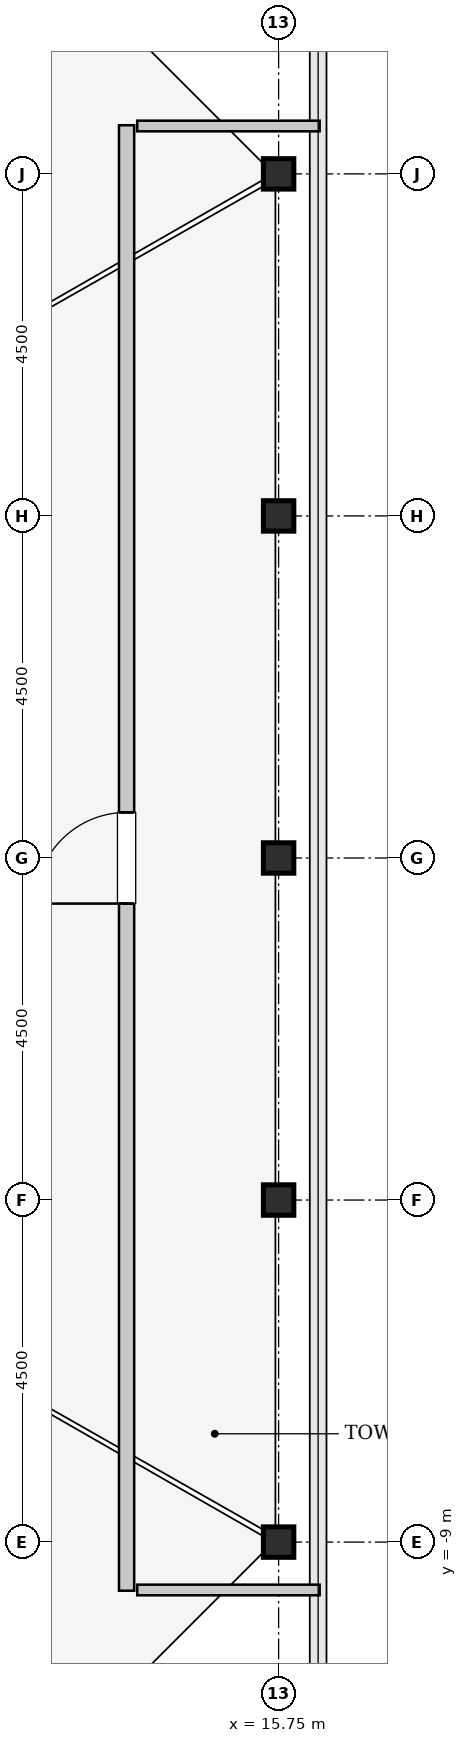
"""IFC4 building model, lengths in metres.
Left out: names, types, materials, properties, quantities, classifications, styles, units other than length and angle.
Written with IfcOpenShell. Run it as: python <this file> out.ifc"""

import sys

from ifc_helpers import new_model, si_unit, direction, frame, frame_2d, origin, origin_2d, place, context, subcontext, project, spatial, rectangle, hollow_rectangle, extrude, source, transform, mapped, element, fill, save


model = new_model("IFC4")
c1 = context("Model", 3, precision=1e-05, world=origin(), true_north=direction((0.0, 1.0)))
c2 = subcontext(c1, "Body", "Model", "MODEL_VIEW")
j1 = project(units=[si_unit("LENGTHUNIT", "METRE"), si_unit("PLANEANGLEUNIT", "RADIAN")], contexts=[c1])
p1 = place(None, origin())
s1 = spatial("IfcSite", under=j1, at=p1, CompositionType="ELEMENT")
p2 = place(p1, origin())
s2 = spatial("IfcBuilding", under=s1, at=p2, CompositionType="ELEMENT")
p3 = place(p2, frame((0.0, 0.0, 367.4)))
s3 = spatial("IfcBuildingStorey", under=s2, at=p3, CompositionType="ELEMENT", Elevation=367.4)
m1 = source(origin(), c2, "Body", "SweptSolid", [
    extrude(hollow_rectangle(XDim=0.4, YDim=0.4, WallThickness=0.02, InnerFilletRadius=0.02, OuterFilletRadius=0.04, at=origin_2d()), origin(), (0.0, 0.0, 1.0), 4.4),
])
for number, where, z_axis, x_axis in (
    (1, (15.75, -9.0, 0.0), (0.0, 0.0, 1.0), (1.0, 0.0, 0.0)),
    (2, (15.75, -4.5, 0.0), (0.0, 0.0, 1.0), (1.0, 0.0, 0.0)),
    (3, (15.75, 0.0, 0.0), (0.0, 0.0, 1.0), (1.0, 0.0, 0.0)),
    (4, (15.75, 4.5, 0.0), (0.0, 0.0, 1.0), (1.0, 0.0, 0.0)),
    (5, (15.75, 9.0, 0.0), (0.0, 0.0, 1.0), (1.0, 0.0, 0.0)),
):
    element("IfcColumn", number, at=place(p3, frame(where, z_axis=z_axis, x_axis=x_axis)), inside=s3, PredefinedType="COLUMN", context=c2, shape_type="MappedRepresentation", body=[
        mapped(m1, transform((0.0, 0.0, 0.0), x_axis=(1.0, 0.0, 0.0), y_axis=(0.0, 1.0, 0.0), z_axis=(0.0, 0.0, 1.0), scale=1.0)),
    ])
m2 = source(origin(), c2, "Body", "SweptSolid", [
    extrude(rectangle(XDim=19.28, YDim=0.2, at=frame_2d((9.64, 0.0))), origin(), (0.0, 0.0, 1.0), 4.085),
])
p4 = place(p3, frame((13.75, -9.64, 0.0), z_axis=(0.0, 0.0, 1.0), x_axis=(0.0, 1.0, 0.0)))
e6 = element("IfcWall", 6, at=p4, inside=s3, PredefinedType="SOLIDWALL", context=c2, shape_type="MappedRepresentation", body=[
    mapped(m2, transform((0.0, 0.0, 0.0), x_axis=(1.0, 0.0, 0.0), y_axis=(0.0, 1.0, 0.0), z_axis=(0.0, 0.0, 1.0), scale=1.0)),
])
p5 = place(p4, frame((9.04, 0.0, 0.0)))
e7 = element("IfcOpeningElement", 7, at=p5, cuts=e6, PredefinedType="OPENING", context=c2, shape_type="SweptSolid", body=[
    extrude(rectangle(XDim=1.2, YDim=2.15, at=frame_2d((0.6, 1.075))), frame((0.0, 0.11, 0.0), z_axis=(0.0, -1.0, 0.0), x_axis=(1.0, 0.0, 0.0)), (0.0, 0.0, 1.0), 0.22),
])
m3 = source(origin(), c2, "Body", "SweptSolid", [
    extrude(rectangle(XDim=2.4, YDim=0.14, at=frame_2d((1.2, 0.0))), origin(), (0.0, 0.0, 1.0), 4.085),
])
for number, where, z_axis, x_axis in (
    (8, (13.89, 9.63, 0.0), (0.0, 0.0, 1.0), (1.0, 0.0, 0.0)),
    (9, (13.89, -9.63, 0.0), (0.0, 0.0, 1.0), (1.0, 0.0, 0.0)),
):
    element("IfcWall", number, at=place(p3, frame(where, z_axis=z_axis, x_axis=x_axis)), inside=s3, PredefinedType="PARTITIONING", context=c2, shape_type="MappedRepresentation", body=[
        mapped(m3, transform((0.0, 0.0, 0.0), x_axis=(1.0, 0.0, 0.0), y_axis=(0.0, 1.0, 0.0), z_axis=(0.0, 0.0, 1.0), scale=1.0)),
    ])
m4 = source(origin(), c2, "Body", "SweptSolid", [
    extrude(rectangle(XDim=1.2, YDim=2.15, at=frame_2d((0.6, 1.075))), frame((0.0, 0.025, 0.0), z_axis=(0.0, -1.0, 0.0), x_axis=(1.0, 0.0, 0.0)), (0.0, 0.0, 1.0), 0.05),
])
p6 = place(p5, origin())
e10 = element("IfcDoor", 10, at=p6, inside=s3, OperationType="SINGLE_SWING_LEFT", PredefinedType="DOOR", context=c2, shape_type="MappedRepresentation", body=[
    mapped(m4, transform((0.0, 0.0, 0.0), x_axis=(1.0, 0.0, 0.0), y_axis=(0.0, 1.0, 0.0), z_axis=(0.0, 0.0, 1.0), scale=1.0)),
])
fill(e7, e10)
save(model, sys.argv[1])
